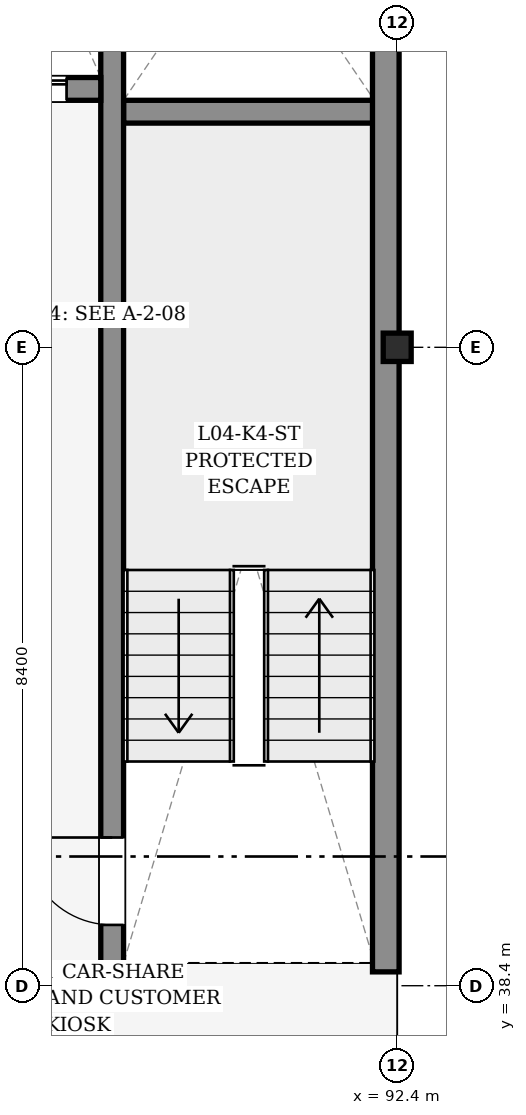
"""IFC4 building model, lengths in metres.
Left out: names, types, materials, properties, quantities, classifications, styles, units other than length and angle.
Written with IfcOpenShell. Run it as: python <this file> out.ifc"""

import sys

from ifc_helpers import new_model, si_unit, direction, frame, frame_2d, origin, origin_2d, place, context, subcontext, project, spatial, rectangle, i_section, extrude, element, fill, save


model = new_model("IFC4")
c1 = context("Model", 3, precision=1e-05, world=origin(), true_north=direction((0.0, 1.0)))
c2 = subcontext(c1, "Body", "Model", "MODEL_VIEW")
j1 = project(units=[si_unit("LENGTHUNIT", "METRE"), si_unit("PLANEANGLEUNIT", "RADIAN")], contexts=[c1])
p1 = place(None, origin())
s1 = spatial("IfcSite", under=j1, at=p1, CompositionType="ELEMENT")
p2 = place(p1, origin())
s2 = spatial("IfcBuilding", under=s1, at=p2, CompositionType="ELEMENT")
p3 = place(p2, frame((0.0, 0.0, 16.2)))
s3 = spatial("IfcBuildingStorey", under=s2, at=p3, CompositionType="ELEMENT", Elevation=16.2)
for number, where, z_axis, x_axis in (
    (1, (92.4, 38.4, 0.0), (0.0, 0.0, 1.0), (1.0, 0.0, 0.0)),
    (2, (92.4, 46.8, 0.0), (0.0, 0.0, 1.0), (1.0, 0.0, 0.0)),
):
    element("IfcColumn", number, at=place(p3, frame(where, z_axis=z_axis, x_axis=x_axis)), inside=s3, PredefinedType="COLUMN", context=c2, shape_type="SweptSolid", body=[
        extrude(i_section(OverallWidth=0.373, OverallDepth=0.368, WebThickness=0.014, FlangeThickness=0.024, FilletRadius=0.015, at=origin_2d()), origin(), (0.0, 0.0, 1.0), 3.6),
    ])
p4 = place(p3, frame((84.185, 38.55, 0.0), z_axis=(0.0, 0.0, 1.0), x_axis=(1.0, 0.0, 0.0)))
e3 = element("IfcWall", 3, at=p4, inside=s3, PredefinedType="SHEAR", context=c2, shape_type="SweptSolid", body=[
    extrude(rectangle(XDim=8.031, YDim=0.3, at=frame_2d((4.016, 0.0))), origin(), (0.0, 0.0, 1.0), 3.38),
])
p5 = place(p3, frame((88.8, 49.9, 0.0), z_axis=(0.0, 0.0, 1.0), x_axis=(1.0, 0.0, 0.0)))
e4 = element("IfcWall", 4, at=p5, inside=s3, PredefinedType="SHEAR", context=c2, shape_type="SweptSolid", body=[
    extrude(rectangle(XDim=3.3, YDim=0.3, at=frame_2d((1.65, 0.0))), origin(), (0.0, 0.0, 1.0), 3.38),
])
p6 = place(p3, frame((92.25, 38.582, 0.0), z_axis=(0.0, 0.0, 1.0), x_axis=(0.0, 1.0, 0.0)))
e5 = element("IfcWall", 5, at=p6, inside=s3, PredefinedType="SHEAR", context=c2, shape_type="SweptSolid", body=[
    extrude(rectangle(XDim=16.436, YDim=0.35, at=frame_2d((8.218, 0.0))), origin(), (0.0, 0.0, 1.0), 3.38),
])
p7 = place(p3, frame((88.65, 38.7, 0.0), z_axis=(0.0, 0.0, 1.0), x_axis=(0.0, 1.0, 0.0)))
e6 = element("IfcWall", 6, at=p7, inside=s3, PredefinedType="SHEAR", context=c2, shape_type="SweptSolid", body=[
    extrude(rectangle(XDim=16.2, YDim=0.3, at=frame_2d((8.1, 0.0))), origin(), (0.0, 0.0, 1.0), 3.38),
])
p8 = place(p7, frame((0.5, 0.0, 0.0)))
e7 = element("IfcOpeningElement", 7, at=p8, cuts=e6, PredefinedType="OPENING", context=c2, shape_type="SweptSolid", body=[
    extrude(rectangle(XDim=1.15, YDim=2.15, at=frame_2d((0.575, 1.075))), frame((0.0, 0.16, 0.0), z_axis=(0.0, -1.0, 0.0), x_axis=(1.0, 0.0, 0.0)), (0.0, 0.0, 1.0), 0.32),
])
p9 = place(p3, frame((86.3, 50.2, 0.0), z_axis=(0.0, 0.0, 1.0), x_axis=(1.0, 0.0, 0.0)))
e8 = element("IfcWall", 8, at=p9, inside=s3, PredefinedType="SHEAR", context=c2, shape_type="SweptSolid", body=[
    extrude(rectangle(XDim=2.2, YDim=0.3, at=frame_2d((1.1, 0.0))), origin(), (0.0, 0.0, 1.0), 3.38),
])
p10 = place(p9, frame((0.65, 0.0, 0.0)))
e9 = element("IfcOpeningElement", 9, at=p10, cuts=e8, PredefinedType="OPENING", context=c2, shape_type="SweptSolid", body=[
    extrude(rectangle(XDim=1.1, YDim=2.2, at=frame_2d((0.55, 1.1))), frame((0.0, 0.16, 0.0), z_axis=(0.0, -1.0, 0.0), x_axis=(1.0, 0.0, 0.0)), (0.0, 0.0, 1.0), 0.32),
])
p11 = place(p8, origin())
e10 = element("IfcDoor", 10, at=p11, inside=s3, OperationType="SINGLE_SWING_RIGHT", PredefinedType="DOOR", context=c2, shape_type="SweptSolid", body=[
    extrude(rectangle(XDim=1.15, YDim=2.15, at=frame_2d((0.575, 1.075))), frame((0.0, 0.025, 0.0), z_axis=(0.0, -1.0, 0.0), x_axis=(1.0, 0.0, 0.0)), (0.0, 0.0, 1.0), 0.05),
])
fill(e7, e10)
p12 = place(p10, origin())
e11 = element("IfcDoor", 11, at=p12, inside=s3, OperationType="SLIDING_TO_LEFT", PredefinedType="DOOR", context=c2, shape_type="SweptSolid", body=[
    extrude(rectangle(XDim=1.1, YDim=2.2, at=frame_2d((0.55, 1.1))), frame((0.0, 0.025, 0.0), z_axis=(0.0, -1.0, 0.0), x_axis=(1.0, 0.0, 0.0)), (0.0, 0.0, 1.0), 0.05),
])
fill(e9, e11)
save(model, sys.argv[1])
